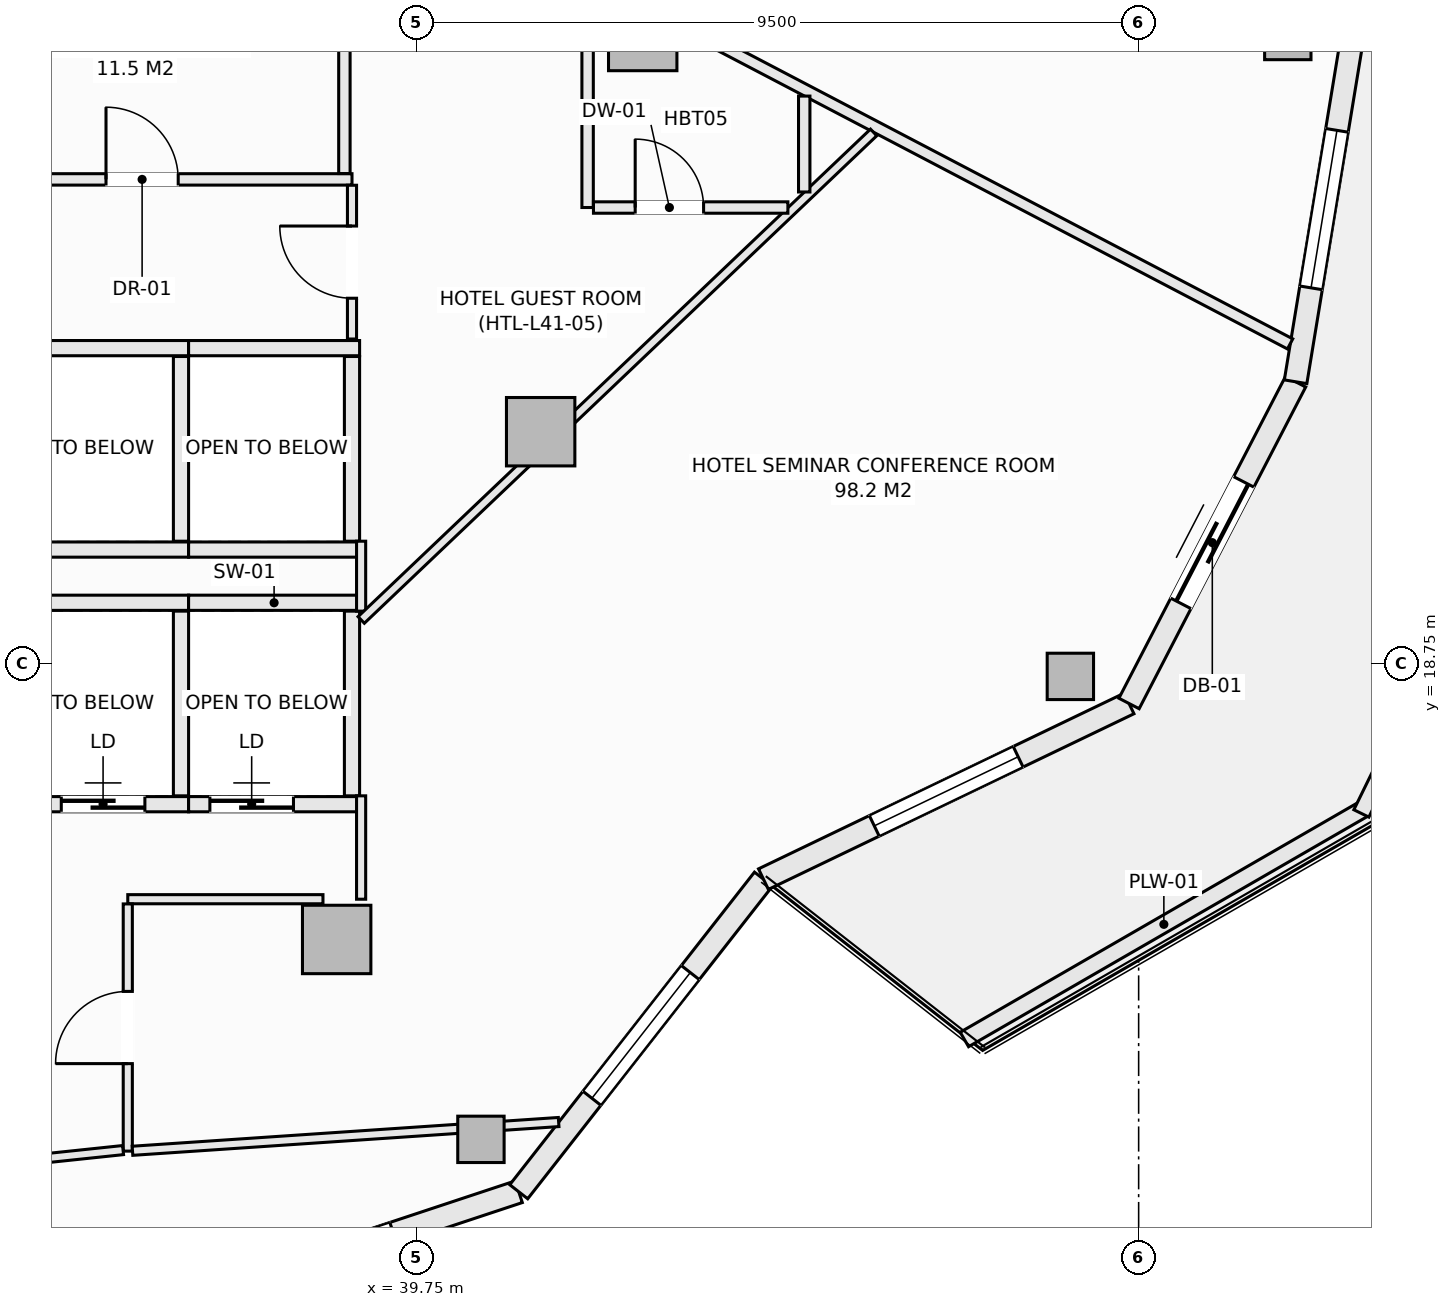
"""IFC4 building model, lengths in metres.
Left out: names, types, materials, properties, quantities, classifications, styles, units other than length and angle.
Written with IfcOpenShell. Run it as: python <this file> out.ifc"""

import sys

from ifc_helpers import new_model, si_unit, direction, frame, frame_2d, origin, origin_2d, place, context, subcontext, project, spatial, rectangle, hollow_rectangle, extrude, element, fill, save


model = new_model("IFC4")
c1 = context("Model", 3, precision=1e-05, world=origin(), true_north=direction((0.0, 1.0)))
c2 = subcontext(c1, "Body", "Model", "MODEL_VIEW")
j1 = project(units=[si_unit("LENGTHUNIT", "METRE"), si_unit("PLANEANGLEUNIT", "RADIAN")], contexts=[c1])
p1 = place(None, origin())
s1 = spatial("IfcSite", under=j1, at=p1, CompositionType="ELEMENT")
p2 = place(p1, origin())
s2 = spatial("IfcBuilding", under=s1, at=p2, CompositionType="ELEMENT")
p3 = place(p2, frame((0.0, 0.0, 159.7)))
s3 = spatial("IfcBuildingStorey", under=s2, at=p3, CompositionType="ELEMENT", Elevation=159.7)
for number, where, z_axis, x_axis in (
    (1, (51.212, 27.0, -0.27), (0.0, 0.0, 1.0), (1.0, 0.0, 0.0)),
    (2, (40.596, 12.49, -0.27), (0.0, 0.0, 1.0), (1.0, 0.0, 0.0)),
    (3, (48.352, 18.581, -0.27), (0.0, 0.0, 1.0), (1.0, 0.0, 0.0)),
):
    element("IfcColumn", number, at=place(p3, frame(where, z_axis=z_axis, x_axis=x_axis)), inside=s3, PredefinedType="COLUMN", context=c2, shape_type="SweptSolid", body=[
        extrude(hollow_rectangle(XDim=0.61, YDim=0.61, WallThickness=0.025, at=origin_2d()), origin(), (0.0, 0.0, 1.0), 3.4),
    ])
for number, where, z_axis, x_axis in (
    (4, (42.725, 27.0, -0.27), (0.0, 0.0, 1.0), (1.0, 0.0, 0.0)),
    (5, (38.698, 15.121, -0.27), (0.0, 0.0, 1.0), (1.0, 0.0, 0.0)),
    (6, (41.382, 21.801, -0.27), (0.0, 0.0, 1.0), (1.0, 0.0, 0.0)),
):
    element("IfcColumn", number, at=place(p3, frame(where, z_axis=z_axis, x_axis=x_axis)), inside=s3, PredefinedType="COLUMN", context=c2, shape_type="SweptSolid", body=[
        extrude(rectangle(XDim=0.9, YDim=0.9, at=origin_2d()), origin(), (0.0, 0.0, 1.0), 3.4),
    ])
p4 = place(p3, frame((35.803, 10.048, 0.0), z_axis=(0.0, 0.0, 1.0), x_axis=(0.949246811547, 0.314532177636, 0.0)))
e7 = element("IfcWall", 7, at=p4, inside=s3, PredefinedType="SOLIDWALL", context=c2, shape_type="SweptSolid", body=[
    extrude(rectangle(XDim=5.574, YDim=0.3, at=frame_2d((2.787, 0.0))), origin(), (0.0, 0.0, 1.0), 2.653),
])
p5 = place(p4, frame((1.737, 0.0, 0.74)))
e8 = element("IfcOpeningElement", 8, at=p5, cuts=e7, PredefinedType="OPENING", context=c2, shape_type="SweptSolid", body=[
    extrude(rectangle(XDim=2.1, YDim=1.7, at=frame_2d((1.05, 0.85))), frame((0.0, 0.16, 0.0), z_axis=(0.0, -1.0, 0.0), x_axis=(1.0, 0.0, 0.0)), (0.0, 0.0, 1.0), 0.32),
])
p6 = place(p3, frame((41.094, 11.801, 0.0), z_axis=(0.0, 0.0, 1.0), x_axis=(0.616429245738, 0.787410302828, 0.0)))
e9 = element("IfcWall", 9, at=p6, inside=s3, PredefinedType="SOLIDWALL", context=c2, shape_type="SweptSolid", body=[
    extrude(rectangle(XDim=5.223, YDim=0.3, at=frame_2d((2.612, 0.0))), origin(), (0.0, 0.0, 1.0), 2.653),
])
p7 = place(p6, frame((1.562, 0.0, 0.74)))
e10 = element("IfcOpeningElement", 10, at=p7, cuts=e9, PredefinedType="OPENING", context=c2, shape_type="SweptSolid", body=[
    extrude(rectangle(XDim=2.1, YDim=1.7, at=frame_2d((1.05, 0.85))), frame((0.0, 0.16, 0.0), z_axis=(0.0, -1.0, 0.0), x_axis=(1.0, 0.0, 0.0)), (0.0, 0.0, 1.0), 0.32),
])
p8 = place(p3, frame((44.313, 15.914, 0.0), z_axis=(0.0, 0.0, 1.0), x_axis=(0.901353070301, 0.433085029363, 0.0)))
e11 = element("IfcWall", 11, at=p8, inside=s3, PredefinedType="SOLIDWALL", context=c2, shape_type="SweptSolid", body=[
    extrude(rectangle(XDim=5.336, YDim=0.3, at=frame_2d((2.668, 0.0))), origin(), (0.0, 0.0, 1.0), 2.653),
])
p9 = place(p8, frame((1.618, 0.0, 0.74)))
e12 = element("IfcOpeningElement", 12, at=p9, cuts=e11, PredefinedType="OPENING", context=c2, shape_type="SweptSolid", body=[
    extrude(rectangle(XDim=2.1, YDim=1.7, at=frame_2d((1.05, 0.85))), frame((0.0, 0.16, 0.0), z_axis=(0.0, -1.0, 0.0), x_axis=(1.0, 0.0, 0.0)), (0.0, 0.0, 1.0), 0.32),
])
p10 = place(p3, frame((49.123, 18.225, 0.0), z_axis=(0.0, 0.0, 1.0), x_axis=(0.459810251451, 0.888017191647, 0.0)))
e13 = element("IfcWall", 13, at=p10, inside=s3, PredefinedType="SOLIDWALL", context=c2, shape_type="SweptSolid", body=[
    extrude(rectangle(XDim=4.766, YDim=0.3, at=frame_2d((2.383, 0.0))), origin(), (0.0, 0.0, 1.0), 2.653),
])
p11 = place(p10, frame((1.483, 0.0, 0.0)))
e14 = element("IfcOpeningElement", 14, at=p11, cuts=e13, PredefinedType="OPENING", context=c2, shape_type="SweptSolid", body=[
    extrude(rectangle(XDim=1.8, YDim=2.25, at=frame_2d((0.9, 1.125))), frame((0.0, 0.16, 0.0), z_axis=(0.0, -1.0, 0.0), x_axis=(1.0, 0.0, 0.0)), (0.0, 0.0, 1.0), 0.32),
])
p12 = place(p3, frame((51.315, 22.458, 0.0), z_axis=(0.0, 0.0, 1.0), x_axis=(0.162394765401, 0.986725868806, 0.0)))
e15 = element("IfcWall", 15, at=p12, inside=s3, PredefinedType="SOLIDWALL", context=c2, shape_type="SweptSolid", body=[
    extrude(rectangle(XDim=4.603, YDim=0.3, at=frame_2d((2.302, 0.0))), origin(), (0.0, 0.0, 1.0), 2.653),
])
p13 = place(p12, frame((1.252, 0.0, 0.74)))
e16 = element("IfcOpeningElement", 16, at=p13, cuts=e15, PredefinedType="OPENING", context=c2, shape_type="SweptSolid", body=[
    extrude(rectangle(XDim=2.1, YDim=1.7, at=frame_2d((1.05, 0.85))), frame((0.0, 0.16, 0.0), z_axis=(0.0, -1.0, 0.0), x_axis=(1.0, 0.0, 0.0)), (0.0, 0.0, 1.0), 0.32),
])
p14 = place(p3, frame((46.958, 13.805, 0.0), z_axis=(0.0, 0.0, 1.0), x_axis=(0.866058128659, 0.499943314571, 0.0)))
e17 = element("IfcWall", 17, at=p14, inside=s3, PredefinedType="PARAPET", context=c2, shape_type="SweptSolid", body=[
    extrude(rectangle(XDim=6.06, YDim=0.22, at=frame_2d((3.03, 0.0))), origin(), (0.0, 0.0, 1.0), 0.52),
])
p15 = place(p3, frame((52.18, 16.779, 0.0), z_axis=(0.0, 0.0, 1.0), x_axis=(0.439637174641, 0.898175458735, 0.0)))
e18 = element("IfcWall", 18, at=p15, inside=s3, PredefinedType="PARAPET", context=c2, shape_type="SweptSolid", body=[
    extrude(rectangle(XDim=5.567, YDim=0.22, at=frame_2d((2.784, 0.0))), origin(), (0.0, 0.0, 1.0), 0.52),
])
p16 = place(p3, frame((34.5, 19.55, 0.0), z_axis=(0.0, 0.0, 1.0), x_axis=(1.0, 0.0, 0.0)))
e19 = element("IfcWall", 19, at=p16, inside=s3, PredefinedType="SOLIDWALL", context=c2, shape_type="SweptSolid", body=[
    extrude(rectangle(XDim=2.25, YDim=0.2, at=frame_2d((1.125, 0.0))), origin(), (0.0, 0.0, 1.0), 3.13),
])
p17 = place(p3, frame((34.5, 16.9, 0.0), z_axis=(0.0, 0.0, 1.0), x_axis=(1.0, 0.0, 0.0)))
e20 = element("IfcWall", 20, at=p17, inside=s3, PredefinedType="SOLIDWALL", context=c2, shape_type="SweptSolid", body=[
    extrude(rectangle(XDim=2.25, YDim=0.2, at=frame_2d((1.125, 0.0))), origin(), (0.0, 0.0, 1.0), 3.13),
])
p18 = place(p17, frame((0.575, 0.0, 0.0)))
e21 = element("IfcOpeningElement", 21, at=p18, cuts=e20, PredefinedType="OPENING", context=c2, shape_type="SweptSolid", body=[
    extrude(rectangle(XDim=1.1, YDim=2.2, at=frame_2d((0.55, 1.1))), frame((0.0, 0.11, 0.0), z_axis=(0.0, -1.0, 0.0), x_axis=(1.0, 0.0, 0.0)), (0.0, 0.0, 1.0), 0.22),
])
p19 = place(p3, frame((36.65, 17.01, 0.0), z_axis=(0.0, 0.0, 1.0), x_axis=(0.0, 1.0, 0.0)))
e22 = element("IfcWall", 22, at=p19, inside=s3, PredefinedType="SOLIDWALL", context=c2, shape_type="SweptSolid", body=[
    extrude(rectangle(XDim=2.43, YDim=0.2, at=frame_2d((1.215, 0.0))), origin(), (0.0, 0.0, 1.0), 3.13),
])
p20 = place(p3, frame((36.75, 19.55, 0.0), z_axis=(0.0, 0.0, 1.0), x_axis=(1.0, 0.0, 0.0)))
e23 = element("IfcWall", 23, at=p20, inside=s3, PredefinedType="SOLIDWALL", context=c2, shape_type="SweptSolid", body=[
    extrude(rectangle(XDim=2.25, YDim=0.2, at=frame_2d((1.125, 0.0))), origin(), (0.0, 0.0, 1.0), 3.13),
])
p21 = place(p3, frame((36.75, 16.9, 0.0), z_axis=(0.0, 0.0, 1.0), x_axis=(1.0, 0.0, 0.0)))
e24 = element("IfcWall", 24, at=p21, inside=s3, PredefinedType="SOLIDWALL", context=c2, shape_type="SweptSolid", body=[
    extrude(rectangle(XDim=2.25, YDim=0.2, at=frame_2d((1.125, 0.0))), origin(), (0.0, 0.0, 1.0), 3.13),
])
p22 = place(p21, frame((0.28, 0.0, 0.0)))
e25 = element("IfcOpeningElement", 25, at=p22, cuts=e24, PredefinedType="OPENING", context=c2, shape_type="SweptSolid", body=[
    extrude(rectangle(XDim=1.1, YDim=2.2, at=frame_2d((0.55, 1.1))), frame((0.0, 0.11, 0.0), z_axis=(0.0, -1.0, 0.0), x_axis=(1.0, 0.0, 0.0)), (0.0, 0.0, 1.0), 0.22),
])
p23 = place(p3, frame((38.9, 17.01, 0.0), z_axis=(0.0, 0.0, 1.0), x_axis=(0.0, 1.0, 0.0)))
e26 = element("IfcWall", 26, at=p23, inside=s3, PredefinedType="SOLIDWALL", context=c2, shape_type="SweptSolid", body=[
    extrude(rectangle(XDim=2.43, YDim=0.2, at=frame_2d((1.215, 0.0))), origin(), (0.0, 0.0, 1.0), 3.13),
])
for number, where, z_axis, x_axis in (
    (27, (34.5, 22.9, 0.0), (0.0, 0.0, 1.0), (1.0, 0.0, 0.0)),
    (28, (34.5, 20.25, 0.0), (0.0, 0.0, 1.0), (1.0, 0.0, 0.0)),
):
    element("IfcWall", number, at=place(p3, frame(where, z_axis=z_axis, x_axis=x_axis)), inside=s3, PredefinedType="SOLIDWALL", context=c2, shape_type="SweptSolid", body=[
        extrude(rectangle(XDim=2.25, YDim=0.2, at=frame_2d((1.125, 0.0))), origin(), (0.0, 0.0, 1.0), 3.13),
    ])
p24 = place(p3, frame((36.65, 20.36, 0.0), z_axis=(0.0, 0.0, 1.0), x_axis=(0.0, 1.0, 0.0)))
e29 = element("IfcWall", 29, at=p24, inside=s3, PredefinedType="SOLIDWALL", context=c2, shape_type="SweptSolid", body=[
    extrude(rectangle(XDim=2.43, YDim=0.2, at=frame_2d((1.215, 0.0))), origin(), (0.0, 0.0, 1.0), 3.13),
])
for number, where, z_axis, x_axis in (
    (30, (36.75, 22.9, 0.0), (0.0, 0.0, 1.0), (1.0, 0.0, 0.0)),
    (31, (36.75, 20.25, 0.0), (0.0, 0.0, 1.0), (1.0, 0.0, 0.0)),
):
    element("IfcWall", number, at=place(p3, frame(where, z_axis=z_axis, x_axis=x_axis)), inside=s3, PredefinedType="SOLIDWALL", context=c2, shape_type="SweptSolid", body=[
        extrude(rectangle(XDim=2.25, YDim=0.2, at=frame_2d((1.125, 0.0))), origin(), (0.0, 0.0, 1.0), 3.13),
    ])
p25 = place(p3, frame((38.9, 20.36, 0.0), z_axis=(0.0, 0.0, 1.0), x_axis=(0.0, 1.0, 0.0)))
e32 = element("IfcWall", 32, at=p25, inside=s3, PredefinedType="SOLIDWALL", context=c2, shape_type="SweptSolid", body=[
    extrude(rectangle(XDim=2.43, YDim=0.2, at=frame_2d((1.215, 0.0))), origin(), (0.0, 0.0, 1.0), 3.13),
])
p26 = place(p3, frame((33.377, 25.12, 0.0), z_axis=(0.0, 0.0, 1.0), x_axis=(1.0, 0.0, 0.0)))
e33 = element("IfcWall", 33, at=p26, inside=s3, PredefinedType="PARTITIONING", context=c2, shape_type="SweptSolid", body=[
    extrude(rectangle(XDim=5.523, YDim=0.15, at=frame_2d((2.761, 0.0))), origin(), (0.0, 0.0, 1.0), 3.13),
])
p27 = place(p26, frame((2.287, 0.0, 0.0)))
e34 = element("IfcOpeningElement", 34, at=p27, cuts=e33, PredefinedType="OPENING", context=c2, shape_type="SweptSolid", body=[
    extrude(rectangle(XDim=0.95, YDim=2.1, at=frame_2d((0.475, 1.05))), frame((0.0, 0.085, 0.0), z_axis=(0.0, -1.0, 0.0), x_axis=(1.0, 0.0, 0.0)), (0.0, 0.0, 1.0), 0.17),
])
p28 = place(p3, frame((38.8, 25.197, 0.0), z_axis=(0.0, 0.0, 1.0), x_axis=(0.0, 1.0, 0.0)))
e35 = element("IfcWall", 35, at=p28, inside=s3, PredefinedType="PARTITIONING", context=c2, shape_type="SweptSolid", body=[
    extrude(rectangle(XDim=1.946, YDim=0.15, at=frame_2d((0.973, 0.0))), origin(), (0.0, 0.0, 1.0), 3.13),
])
p29 = place(p3, frame((39.02, 15.65, 0.0), z_axis=(0.0, 0.0, 1.0), x_axis=(0.0, 1.0, 0.0)))
e36 = element("IfcWall", 36, at=p29, inside=s3, PredefinedType="PARTITIONING", context=c2, shape_type="SweptSolid", body=[
    extrude(rectangle(XDim=1.36, YDim=0.12, at=frame_2d((0.68, 0.0))), origin(), (0.0, 0.0, 1.0), 2.505),
])
p30 = place(p3, frame((39.02, 19.44, 0.0), z_axis=(0.0, 0.0, 1.0), x_axis=(0.0, 1.0, 0.0)))
e37 = element("IfcWall", 37, at=p30, inside=s3, PredefinedType="PARTITIONING", context=c2, shape_type="SweptSolid", body=[
    extrude(rectangle(XDim=0.92, YDim=0.12, at=frame_2d((0.46, 0.0))), origin(), (0.0, 0.0, 1.0), 3.13),
])
p31 = place(p3, frame((35.95, 15.65, 0.0), z_axis=(0.0, 0.0, 1.0), x_axis=(1.0, 0.0, 0.0)))
e38 = element("IfcWall", 38, at=p31, inside=s3, PredefinedType="PARTITIONING", context=c2, shape_type="SweptSolid", body=[
    extrude(rectangle(XDim=2.568, YDim=0.12, at=frame_2d((1.284, 0.0))), origin(), (0.0, 0.0, 1.0), 3.13),
])
p32 = place(p3, frame((35.95, 12.336, 0.0), z_axis=(0.0, 0.0, 1.0), x_axis=(0.0, 1.0, 0.0)))
e39 = element("IfcWall", 39, at=p32, inside=s3, PredefinedType="PARTITIONING", context=c2, shape_type="SweptSolid", body=[
    extrude(rectangle(XDim=3.252, YDim=0.12, at=frame_2d((1.626, 0.0))), origin(), (0.0, 0.0, 1.0), 3.13),
])
p33 = place(p32, frame((1.151, 0.0, 0.0)))
e40 = element("IfcOpeningElement", 40, at=p33, cuts=e39, PredefinedType="OPENING", context=c2, shape_type="SweptSolid", body=[
    extrude(rectangle(XDim=0.95, YDim=2.1, at=frame_2d((0.475, 1.05))), frame((0.0, 0.07, 0.0), z_axis=(0.0, -1.0, 0.0), x_axis=(1.0, 0.0, 0.0)), (0.0, 0.0, 1.0), 0.14),
])
p34 = place(p3, frame((30.195, 11.75, 0.0), z_axis=(0.0, 0.0, 1.0), x_axis=(0.994498907508, 0.104746947287, 0.0)))
e41 = element("IfcWall", 41, at=p34, inside=s3, PredefinedType="PARTITIONING", context=c2, shape_type="SweptSolid", body=[
    extrude(rectangle(XDim=5.724, YDim=0.12, at=frame_2d((2.862, 0.0))), origin(), (0.0, 0.0, 1.0), 3.13),
])
p35 = place(p34, frame((2.594, 0.0, 0.0)))
e42 = element("IfcOpeningElement", 42, at=p35, cuts=e41, PredefinedType="OPENING", context=c2, shape_type="SweptSolid", body=[
    extrude(rectangle(XDim=0.95, YDim=2.1, at=frame_2d((0.475, 1.05))), frame((0.0, 0.07, 0.0), z_axis=(0.0, -1.0, 0.0), x_axis=(1.0, 0.0, 0.0)), (0.0, 0.0, 1.0), 0.14),
])
p36 = place(p3, frame((38.9, 23.02, 0.0), z_axis=(0.0, 0.0, 1.0), x_axis=(0.0, 1.0, 0.0)))
e43 = element("IfcWall", 43, at=p36, inside=s3, PredefinedType="PARTITIONING", context=c2, shape_type="SweptSolid", body=[
    extrude(rectangle(XDim=2.023, YDim=0.12, at=frame_2d((1.011, 0.0))), origin(), (0.0, 0.0, 1.0), 3.13),
])
p37 = place(p36, frame((0.537, 0.0, 0.0)))
e44 = element("IfcOpeningElement", 44, at=p37, cuts=e43, PredefinedType="OPENING", context=c2, shape_type="SweptSolid", body=[
    extrude(rectangle(XDim=0.95, YDim=2.1, at=frame_2d((0.475, 1.05))), frame((0.0, 0.07, 0.0), z_axis=(0.0, -1.0, 0.0), x_axis=(1.0, 0.0, 0.0)), (0.0, 0.0, 1.0), 0.14),
])
p38 = place(p3, frame((38.962, 29.386, 0.0), z_axis=(0.0, 0.0, 1.0), x_axis=(0.885905291329, -0.463866160434, 0.0)))
e45 = element("IfcWall", 45, at=p38, inside=s3, PredefinedType="PARTITIONING", context=c2, shape_type="SweptSolid", body=[
    extrude(rectangle(XDim=13.863, YDim=0.15, at=frame_2d((6.931, 0.0))), origin(), (0.0, 0.0, 1.0), 2.505),
])
p39 = place(p3, frame((39.021, 19.324, 0.0), z_axis=(0.0, 0.0, 1.0), x_axis=(0.724517158733, 0.689256763986, 0.0)))
e46 = element("IfcWall", 46, at=p39, inside=s3, PredefinedType="PARTITIONING", context=c2, shape_type="SweptSolid", body=[
    extrude(rectangle(XDim=9.306, YDim=0.12, at=frame_2d((4.653, 0.0))), origin(), (0.0, 0.0, 1.0), 2.505),
])
p40 = place(p3, frame((36.012, 12.34, 0.0), z_axis=(0.0, 0.0, 1.0), x_axis=(0.997733146572, 0.067294637466, 0.0)))
e47 = element("IfcWall", 47, at=p40, inside=s3, PredefinedType="PARTITIONING", context=c2, shape_type="SweptSolid", body=[
    extrude(rectangle(XDim=5.62, YDim=0.12, at=frame_2d((2.81, 0.0))), origin(), (0.0, 0.0, 1.0), 2.653),
])
p41 = place(p3, frame((42.0, 24.75, 0.0), z_axis=(0.0, 0.0, 1.0), x_axis=(0.0, 1.0, 0.0)))
e48 = element("IfcWall", 48, at=p41, inside=s3, PredefinedType="PARTITIONING", context=c2, shape_type="SweptSolid", body=[
    extrude(rectangle(XDim=2.473, YDim=0.15, at=frame_2d((1.236, 0.0))), origin(), (0.0, 0.0, 1.0), 2.505),
])
p42 = place(p3, frame((42.077, 24.75, 0.0), z_axis=(0.0, 0.0, 1.0), x_axis=(1.0, 0.0, 0.0)))
e49 = element("IfcWall", 49, at=p42, inside=s3, PredefinedType="PARTITIONING", context=c2, shape_type="SweptSolid", body=[
    extrude(rectangle(XDim=2.558, YDim=0.15, at=frame_2d((1.279, 0.0))), origin(), (0.0, 0.0, 1.0), 3.13),
])
p43 = place(p42, frame((0.549, 0.0, 0.0)))
e50 = element("IfcOpeningElement", 50, at=p43, cuts=e49, PredefinedType="OPENING", context=c2, shape_type="SweptSolid", body=[
    extrude(rectangle(XDim=0.9, YDim=2.1, at=frame_2d((0.45, 1.05))), frame((0.0, 0.085, 0.0), z_axis=(0.0, -1.0, 0.0), x_axis=(1.0, 0.0, 0.0)), (0.0, 0.0, 1.0), 0.17),
])
p44 = place(p3, frame((44.85, 24.955, 0.0), z_axis=(0.0, 0.0, 1.0), x_axis=(0.0, 1.0, 0.0)))
e51 = element("IfcWall", 51, at=p44, inside=s3, PredefinedType="PARTITIONING", context=c2, shape_type="SweptSolid", body=[
    extrude(rectangle(XDim=1.261, YDim=0.15, at=frame_2d((0.631, 0.0))), origin(), (0.0, 0.0, 1.0), 3.13),
])
p45 = place(p7, origin())
e52 = element("IfcWindow", 52, at=p45, inside=s3, PartitioningType="SINGLE_PANEL", PredefinedType="WINDOW", context=c2, shape_type="SweptSolid", body=[
    extrude(rectangle(XDim=2.1, YDim=1.7, at=frame_2d((1.05, 0.85))), frame((0.0, 0.03, 0.0), z_axis=(0.0, -1.0, 0.0), x_axis=(1.0, 0.0, 0.0)), (0.0, 0.0, 1.0), 0.06),
])
fill(e10, e52)
p46 = place(p9, origin())
e53 = element("IfcWindow", 53, at=p46, inside=s3, PartitioningType="SINGLE_PANEL", PredefinedType="WINDOW", context=c2, shape_type="SweptSolid", body=[
    extrude(rectangle(XDim=2.1, YDim=1.7, at=frame_2d((1.05, 0.85))), frame((0.0, 0.03, 0.0), z_axis=(0.0, -1.0, 0.0), x_axis=(1.0, 0.0, 0.0)), (0.0, 0.0, 1.0), 0.06),
])
fill(e12, e53)
p47 = place(p11, frame((1.8, 0.0, 0.0), z_axis=(0.0, 0.0, 1.0), x_axis=(-1.0, 0.0, 0.0)))
e54 = element("IfcDoor", 54, at=p47, inside=s3, OperationType="SLIDING_TO_LEFT", PredefinedType="DOOR", context=c2, shape_type="SweptSolid", body=[
    extrude(rectangle(XDim=1.8, YDim=2.25, at=frame_2d((0.9, 1.125))), frame((0.0, 0.025, 0.0), z_axis=(0.0, -1.0, 0.0), x_axis=(1.0, 0.0, 0.0)), (0.0, 0.0, 1.0), 0.05),
])
fill(e14, e54)
p48 = place(p13, origin())
e55 = element("IfcWindow", 55, at=p48, inside=s3, PartitioningType="SINGLE_PANEL", PredefinedType="WINDOW", context=c2, shape_type="SweptSolid", body=[
    extrude(rectangle(XDim=2.1, YDim=1.7, at=frame_2d((1.05, 0.85))), frame((0.0, 0.03, 0.0), z_axis=(0.0, -1.0, 0.0), x_axis=(1.0, 0.0, 0.0)), (0.0, 0.0, 1.0), 0.06),
])
fill(e16, e55)
p49 = place(p18, origin())
e56 = element("IfcDoor", 56, at=p49, inside=s3, OperationType="SLIDING_TO_LEFT", PredefinedType="DOOR", context=c2, shape_type="SweptSolid", body=[
    extrude(rectangle(XDim=1.1, YDim=2.2, at=frame_2d((0.55, 1.1))), frame((0.0, 0.025, 0.0), z_axis=(0.0, -1.0, 0.0), x_axis=(1.0, 0.0, 0.0)), (0.0, 0.0, 1.0), 0.05),
])
fill(e21, e56)
p50 = place(p22, origin())
e57 = element("IfcDoor", 57, at=p50, inside=s3, OperationType="SLIDING_TO_LEFT", PredefinedType="DOOR", context=c2, shape_type="SweptSolid", body=[
    extrude(rectangle(XDim=1.1, YDim=2.2, at=frame_2d((0.55, 1.1))), frame((0.0, 0.025, 0.0), z_axis=(0.0, -1.0, 0.0), x_axis=(1.0, 0.0, 0.0)), (0.0, 0.0, 1.0), 0.05),
])
fill(e25, e57)
p51 = place(p27, origin())
e58 = element("IfcDoor", 58, at=p51, inside=s3, OperationType="SINGLE_SWING_LEFT", PredefinedType="DOOR", context=c2, shape_type="SweptSolid", body=[
    extrude(rectangle(XDim=0.95, YDim=2.1, at=frame_2d((0.475, 1.05))), frame((0.0, 0.025, 0.0), z_axis=(0.0, -1.0, 0.0), x_axis=(1.0, 0.0, 0.0)), (0.0, 0.0, 1.0), 0.05),
])
fill(e34, e58)
p52 = place(p33, origin())
e59 = element("IfcDoor", 59, at=p52, inside=s3, OperationType="SINGLE_SWING_LEFT", PredefinedType="DOOR", context=c2, shape_type="SweptSolid", body=[
    extrude(rectangle(XDim=0.95, YDim=2.1, at=frame_2d((0.475, 1.05))), frame((0.0, 0.025, 0.0), z_axis=(0.0, -1.0, 0.0), x_axis=(1.0, 0.0, 0.0)), (0.0, 0.0, 1.0), 0.05),
])
fill(e40, e59)
p53 = place(p37, origin())
e60 = element("IfcDoor", 60, at=p53, inside=s3, OperationType="SINGLE_SWING_RIGHT", PredefinedType="DOOR", context=c2, shape_type="SweptSolid", body=[
    extrude(rectangle(XDim=0.95, YDim=2.1, at=frame_2d((0.475, 1.05))), frame((0.0, 0.025, 0.0), z_axis=(0.0, -1.0, 0.0), x_axis=(1.0, 0.0, 0.0)), (0.0, 0.0, 1.0), 0.05),
])
fill(e44, e60)
p54 = place(p43, origin())
e61 = element("IfcDoor", 61, at=p54, inside=s3, OperationType="SINGLE_SWING_LEFT", PredefinedType="DOOR", context=c2, shape_type="SweptSolid", body=[
    extrude(rectangle(XDim=0.9, YDim=2.1, at=frame_2d((0.45, 1.05))), frame((0.0, 0.025, 0.0), z_axis=(0.0, -1.0, 0.0), x_axis=(1.0, 0.0, 0.0)), (0.0, 0.0, 1.0), 0.05),
])
fill(e50, e61)
save(model, sys.argv[1])
